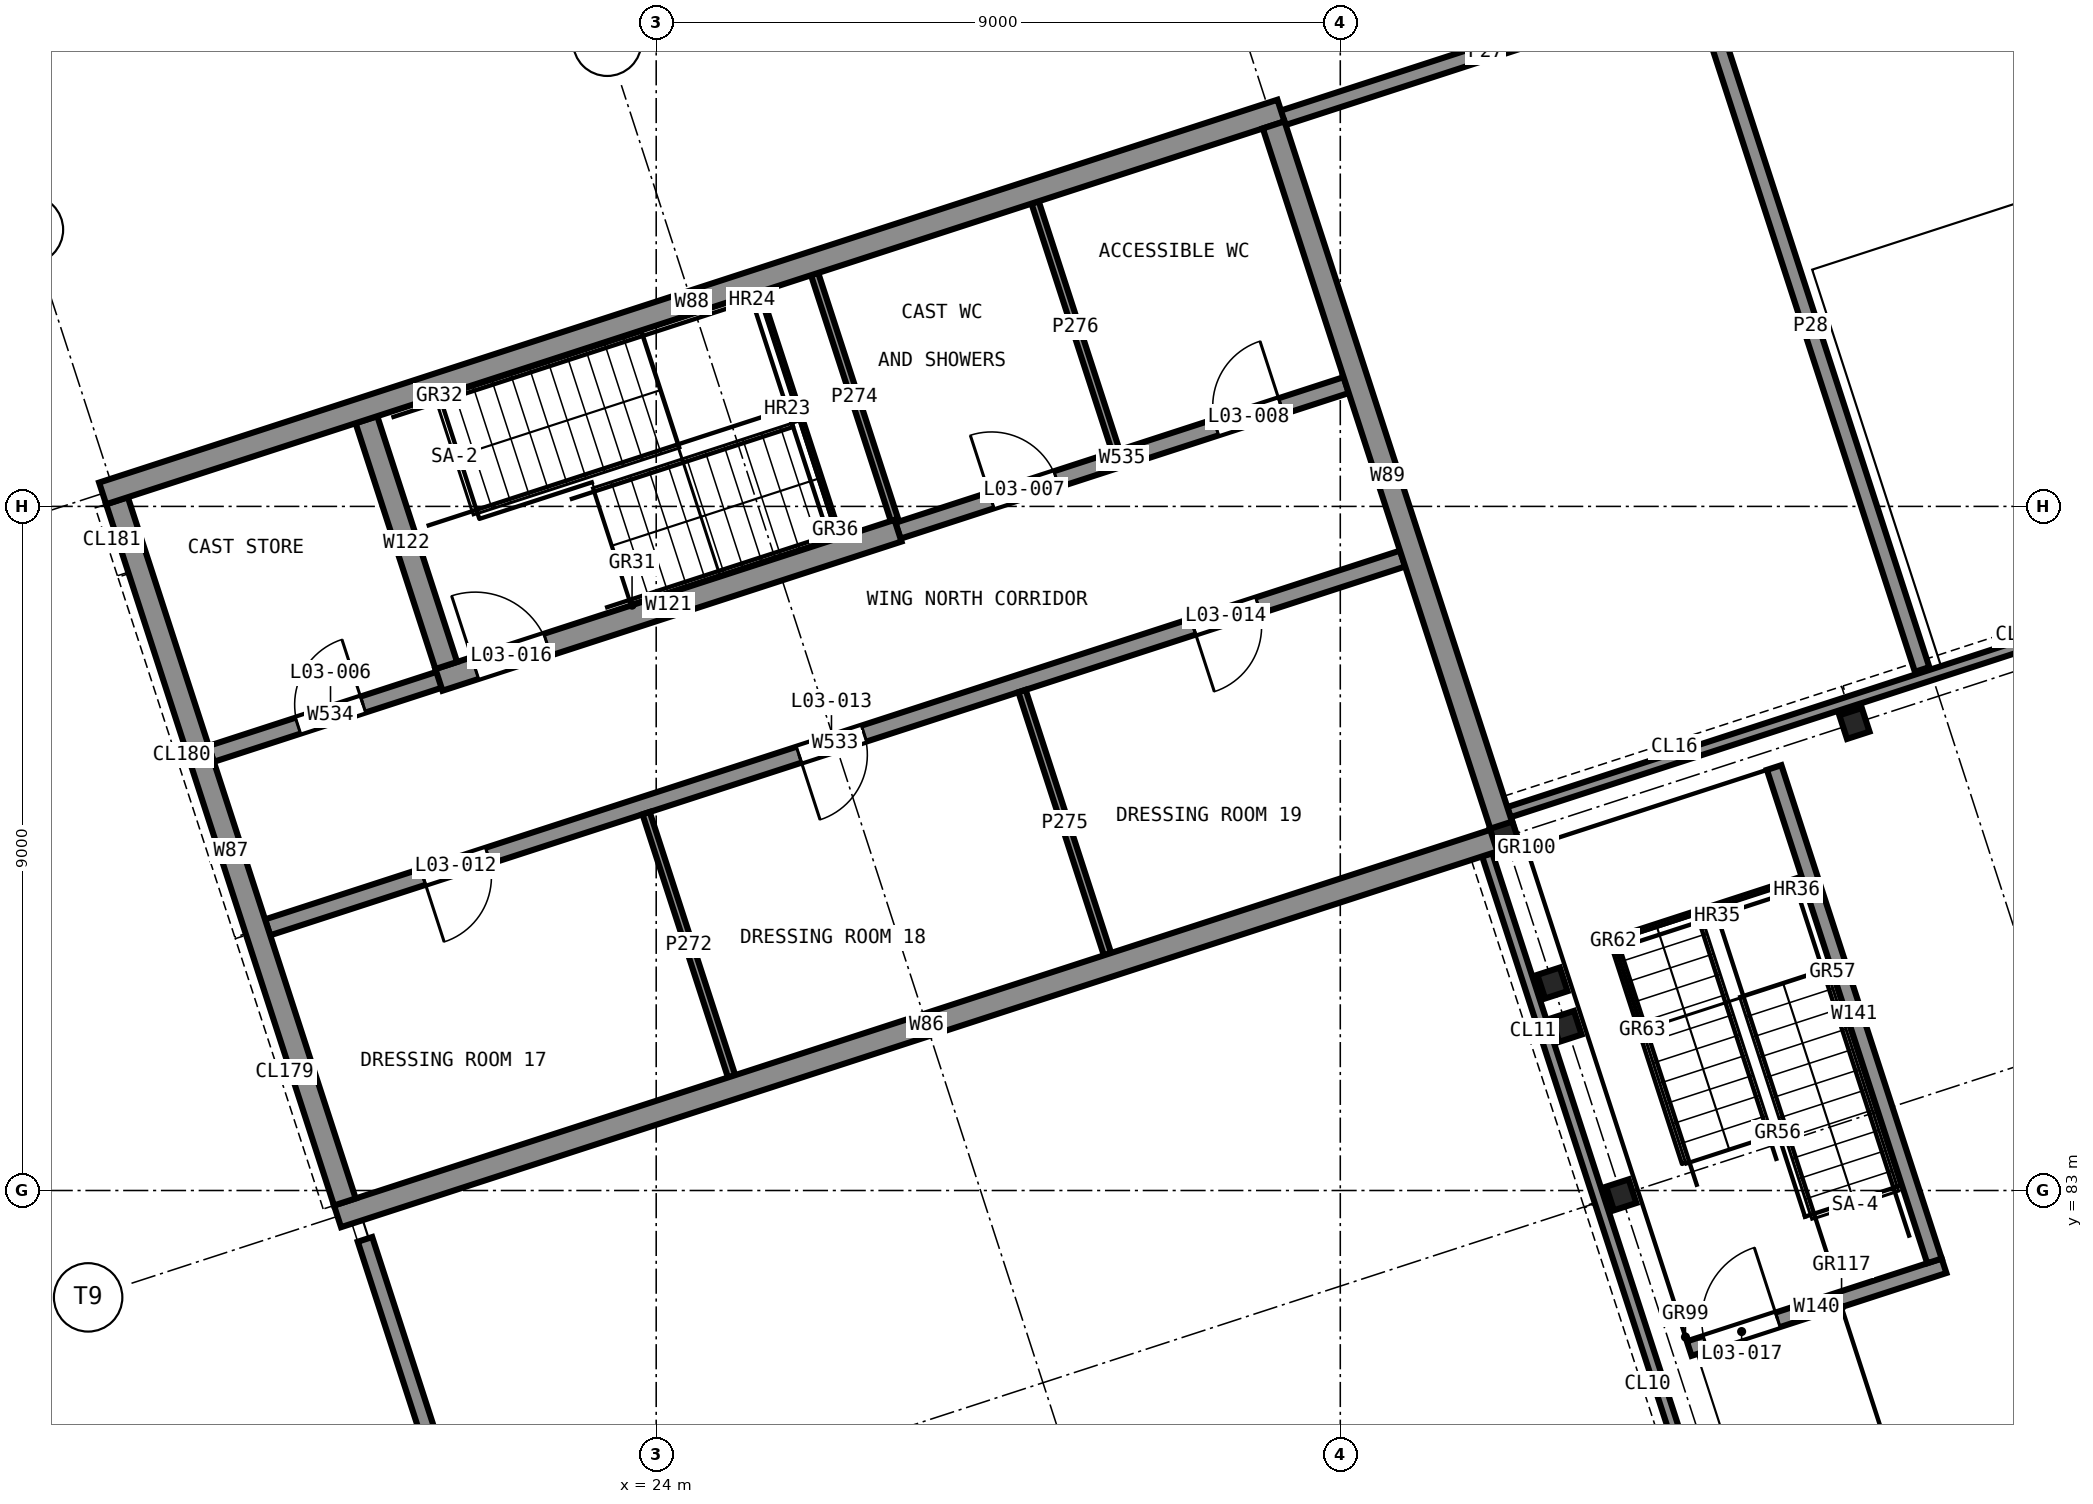
"""IFC4 building model, lengths in metres.
Left out: names, types, materials, properties, quantities, classifications, styles, units other than length and angle.
Written with IfcOpenShell. Run it as: python <this file> out.ifc"""

import sys

from ifc_helpers import new_model, si_unit, direction, frame, frame_2d, origin, origin_2d, place, context, subcontext, project, spatial, rectangle, i_section, extrude, element, fill, save


model = new_model("IFC4")
c1 = context("Model", 3, precision=1e-05, world=origin(), true_north=direction((0.0, 1.0)))
c2 = subcontext(c1, "Body", "Model", "MODEL_VIEW")
j1 = project(units=[si_unit("LENGTHUNIT", "METRE"), si_unit("PLANEANGLEUNIT", "RADIAN")], contexts=[c1])
p1 = place(None, origin())
s1 = spatial("IfcSite", under=j1, at=p1, CompositionType="ELEMENT")
p2 = place(p1, origin())
s2 = spatial("IfcBuilding", under=s1, at=p2, CompositionType="ELEMENT")
p3 = place(p2, frame((0.0, 0.0, 13.5)))
s3 = spatial("IfcBuildingStorey", under=s2, at=p3, CompositionType="ELEMENT", Elevation=13.5)
p4 = place(p3, frame((35.31, 87.697, 0.0), z_axis=(0.0, 0.0, 1.0), x_axis=(-0.951058391285, -0.309011223689, 0.0)))
e1 = element("IfcWall", 1, at=p4, inside=s3, PredefinedType="SOLIDWALL", context=c2, shape_type="SweptSolid", body=[
    extrude(rectangle(XDim=16.3, YDim=0.3, at=frame_2d((8.15, 0.0))), origin(), (0.0, 0.0, 1.0), 4.0),
])
p5 = place(p3, frame((19.904, 82.849, 0.0), z_axis=(0.0, 0.0, 1.0), x_axis=(-0.309000135, 0.951061994073, 0.0)))
e2 = element("IfcWall", 2, at=p5, inside=s3, PredefinedType="SOLIDWALL", context=c2, shape_type="SweptSolid", body=[
    extrude(rectangle(XDim=9.7, YDim=0.3, at=frame_2d((4.85, 0.0))), origin(), (0.0, 0.0, 1.0), 4.0),
])
p6 = place(p3, frame((16.718, 92.171, 0.0), z_axis=(0.0, 0.0, 1.0), x_axis=(0.951058391285, 0.309011223689, 0.0)))
e3 = element("IfcWall", 3, at=p6, inside=s3, PredefinedType="SOLIDWALL", context=c2, shape_type="SweptSolid", body=[
    extrude(rectangle(XDim=16.3, YDim=0.3, at=frame_2d((8.15, 0.0))), origin(), (0.0, 0.0, 1.0), 4.0),
])
p7 = place(p3, frame((32.123, 97.019, 0.0), z_axis=(0.0, 0.0, 1.0), x_axis=(0.309030297822, -0.95105219364, 0.0)))
e4 = element("IfcWall", 4, at=p7, inside=s3, PredefinedType="SOLIDWALL", context=c2, shape_type="SweptSolid", body=[
    extrude(rectangle(XDim=9.7, YDim=0.3, at=frame_2d((4.85, 0.0))), origin(), (0.0, 0.0, 1.0), 4.0),
])
for number, where, z_axis, x_axis in (
    (5, (35.977, 85.159, 0.0), (0.0, 0.0, 1.0), (0.951, 0.309, 0.0)),
    (6, (35.792, 85.729, 0.0), (0.0, 0.0, 1.0), (0.951, 0.309, 0.0)),
):
    element("IfcColumn", number, at=place(p3, frame(where, z_axis=z_axis, x_axis=x_axis)), inside=s3, PredefinedType="COLUMN", context=c2, shape_type="SweptSolid", body=[
        extrude(i_section(OverallWidth=0.311, OverallDepth=0.327, WebThickness=0.016, FlangeThickness=0.025, FilletRadius=0.017, at=origin_2d()), origin(), (0.0, 0.0, 1.0), 4.0),
    ])
p8 = place(p3, frame((27.181, 91.68, 0.0), z_axis=(0.0, 0.0, 1.0), x_axis=(-0.951051301895, -0.309033042189, 0.0)))
e7 = element("IfcWall", 7, at=p8, inside=s3, PredefinedType="SOLIDWALL", context=c2, shape_type="SweptSolid", body=[
    extrude(rectangle(XDim=6.35, YDim=0.3, at=frame_2d((3.175, 0.0))), origin(), (0.0, 0.0, 1.0), 3.7),
])
p9 = place(p8, frame((4.85, 0.0, 0.0)))
e8 = element("IfcOpeningElement", 8, at=p9, cuts=e7, PredefinedType="OPENING", context=c2, shape_type="SweptSolid", body=[
    extrude(rectangle(XDim=1.0, YDim=2.1, at=frame_2d((0.5, 1.05))), frame((0.0, 0.16, 0.0), z_axis=(0.0, -1.0, 0.0), x_axis=(1.0, 0.0, 0.0)), (0.0, 0.0, 1.0), 0.32),
])
p10 = place(p3, frame((21.238, 89.907, 0.0), z_axis=(0.0, 0.0, 1.0), x_axis=(-0.309066587596, 0.951040401051, 0.0)))
e9 = element("IfcWall", 9, at=p10, inside=s3, PredefinedType="SOLIDWALL", context=c2, shape_type="SweptSolid", body=[
    extrude(rectangle(XDim=3.4, YDim=0.3, at=frame_2d((1.7, 0.0))), origin(), (0.0, 0.0, 1.0), 3.7),
])
p11 = place(p3, frame((37.591, 80.92, 0.0), z_axis=(0.0, 0.0, 1.0), x_axis=(0.951052389726, 0.30902969436, 0.0)))
e10 = element("IfcWall", 10, at=p11, inside=s3, PredefinedType="SOLIDWALL", context=c2, shape_type="SweptSolid", body=[
    extrude(rectangle(XDim=3.525, YDim=0.2, at=frame_2d((1.763, 0.0))), origin(), (0.0, 0.0, 1.0), 4.0),
])
p12 = place(p11, frame((0.225, 0.0, 0.0)))
e11 = element("IfcOpeningElement", 11, at=p12, cuts=e10, PredefinedType="OPENING", context=c2, shape_type="SweptSolid", body=[
    extrude(rectangle(XDim=1.0, YDim=2.1, at=frame_2d((0.5, 1.05))), frame((0.0, 0.11, 0.0), z_axis=(0.0, -1.0, 0.0), x_axis=(1.0, 0.0, 0.0)), (0.0, 0.0, 1.0), 0.22),
])
p13 = place(p3, frame((40.817, 82.074, 0.0), z_axis=(0.0, 0.0, 1.0), x_axis=(-0.309028643499, 0.951052731186, 0.0)))
e12 = element("IfcWall", 12, at=p13, inside=s3, PredefinedType="SOLIDWALL", context=c2, shape_type="SweptSolid", body=[
    extrude(rectangle(XDim=6.825, YDim=0.2, at=frame_2d((3.413, 0.0))), origin(), (0.0, 0.0, 1.0), 4.0),
])
for number, where, z_axis, x_axis in (
    (13, (36.697, 82.943, 0.0), (0.0, 0.0, 1.0), (0.951, 0.309, 0.0)),
    (14, (35.167, 87.651, 0.0), (0.0, 0.0, 1.0), (0.951, 0.309, 0.0)),
    (15, (39.764, 89.144, 0.0), (0.0, 0.0, 1.0), (0.951, 0.309, 0.0)),
):
    element("IfcColumn", number, at=place(p3, frame(where, z_axis=z_axis, x_axis=x_axis)), inside=s3, PredefinedType="COLUMN", context=c2, shape_type="SweptSolid", body=[
        extrude(i_section(OverallWidth=0.311, OverallDepth=0.327, WebThickness=0.016, FlangeThickness=0.025, FilletRadius=0.017, at=origin_2d()), origin(), (0.0, 0.0, 1.0), 4.0),
    ])
p14 = place(p3, frame((41.005, 68.729, 0.0), z_axis=(0.0, 0.0, 1.0), x_axis=(-0.309017523599, 0.95105634434, 0.0)))
e16 = element("IfcWall", 16, at=p14, inside=s3, PredefinedType="SOLIDWALL", context=c2, shape_type="SweptSolid", body=[
    extrude(rectangle(XDim=19.65, YDim=0.14, at=frame_2d((9.825, 0.0))), origin(), (0.0, 0.0, 1.0), 4.0),
])
p15 = place(p3, frame((35.219, 87.978, 0.0), z_axis=(0.0, 0.0, 1.0), x_axis=(0.951055192004, 0.309021070093, 0.0)))
e17 = element("IfcWall", 17, at=p15, inside=s3, PredefinedType="SOLIDWALL", context=c2, shape_type="SweptSolid", body=[
    extrude(rectangle(XDim=29.215, YDim=0.14, at=frame_2d((14.607, 0.0))), origin(), (0.0, 0.0, 1.0), 4.0),
])
p16 = place(p3, frame((26.102, 64.097, 0.0), z_axis=(0.0, 0.0, 1.0), x_axis=(-0.309016491071, 0.951056679828, 0.0)))
e18 = element("IfcWall", 18, at=p16, inside=s3, PredefinedType="PARAPET", context=c2, shape_type="SweptSolid", body=[
    extrude(rectangle(XDim=19.2, YDim=0.2, at=frame_2d((9.6, 0.0))), origin(), (0.0, 0.0, 1.0), 1.0),
])
p17 = place(p3, frame((32.108, 97.066, 0.0), z_axis=(0.0, 0.0, 1.0), x_axis=(0.951055960514, 0.309018704887, 0.0)))
e19 = element("IfcWall", 19, at=p17, inside=s3, PredefinedType="PARAPET", context=c2, shape_type="SweptSolid", body=[
    extrude(rectangle(XDim=5.9, YDim=0.2, at=frame_2d((2.95, 0.0))), origin(), (0.0, 0.0, 1.0), 1.0),
])
p18 = place(p3, frame((37.719, 98.889, 0.0), z_axis=(0.0, 0.0, 1.0), x_axis=(0.309002393867, -0.951061260164, 0.0)))
e20 = element("IfcWall", 20, at=p18, inside=s3, PredefinedType="PARAPET", context=c2, shape_type="SweptSolid", body=[
    extrude(rectangle(XDim=9.5, YDim=0.2, at=frame_2d((4.75, 0.0))), origin(), (0.0, 0.0, 1.0), 1.0),
])
p19 = place(p3, frame((18.888, 86.462, 0.0), z_axis=(0.0, 0.0, 1.0), x_axis=(0.951056921306, 0.309015747878, 0.0)))
e21 = element("IfcWall", 21, at=p19, inside=s3, PredefinedType="SOLIDWALL", context=c2, shape_type="SweptSolid", body=[
    extrude(rectangle(XDim=15.7, YDim=0.22, at=frame_2d((7.85, 0.0))), origin(), (0.0, 0.0, 1.0), 3.7),
])
p20 = place(p19, frame((2.15, 0.0, 0.0)))
e22 = element("IfcOpeningElement", 22, at=p20, cuts=e21, PredefinedType="OPENING", context=c2, shape_type="SweptSolid", body=[
    extrude(rectangle(XDim=0.9, YDim=2.1, at=frame_2d((0.45, 1.05))), frame((0.0, 0.12, 0.0), z_axis=(0.0, -1.0, 0.0), x_axis=(1.0, 0.0, 0.0)), (0.0, 0.0, 1.0), 0.24),
])
p21 = place(p19, frame((7.35, 0.0, 0.0)))
e23 = element("IfcOpeningElement", 23, at=p21, cuts=e21, PredefinedType="OPENING", context=c2, shape_type="SweptSolid", body=[
    extrude(rectangle(XDim=0.9, YDim=2.1, at=frame_2d((0.45, 1.05))), frame((0.0, 0.12, 0.0), z_axis=(0.0, -1.0, 0.0), x_axis=(1.0, 0.0, 0.0)), (0.0, 0.0, 1.0), 0.24),
])
p22 = place(p19, frame((12.804, 0.0, 0.0)))
e24 = element("IfcOpeningElement", 24, at=p22, cuts=e21, PredefinedType="OPENING", context=c2, shape_type="SweptSolid", body=[
    extrude(rectangle(XDim=0.9, YDim=2.1, at=frame_2d((0.45, 1.05))), frame((0.0, 0.12, 0.0), z_axis=(0.0, -1.0, 0.0), x_axis=(1.0, 0.0, 0.0)), (0.0, 0.0, 1.0), 0.24),
])
p23 = place(p3, frame((18.146, 88.744, 0.0), z_axis=(0.0, 0.0, 1.0), x_axis=(0.951053095941, 0.309027520945, 0.0)))
e25 = element("IfcWall", 25, at=p23, inside=s3, PredefinedType="SOLIDWALL", context=c2, shape_type="SweptSolid", body=[
    extrude(rectangle(XDim=3.3, YDim=0.22, at=frame_2d((1.65, 0.0))), origin(), (0.0, 0.0, 1.0), 3.7),
])
p24 = place(p23, frame((1.2, 0.0, 0.0)))
e26 = element("IfcOpeningElement", 26, at=p24, cuts=e25, PredefinedType="OPENING", context=c2, shape_type="SweptSolid", body=[
    extrude(rectangle(XDim=0.9, YDim=2.1, at=frame_2d((0.45, 1.05))), frame((0.0, 0.12, 0.0), z_axis=(0.0, -1.0, 0.0), x_axis=(1.0, 0.0, 0.0)), (0.0, 0.0, 1.0), 0.24),
])
p25 = place(p3, frame((27.181, 91.68, 0.0), z_axis=(0.0, 0.0, 1.0), x_axis=(0.95106184554, 0.309000592164, 0.0)))
e27 = element("IfcWall", 27, at=p25, inside=s3, PredefinedType="SOLIDWALL", context=c2, shape_type="SweptSolid", body=[
    extrude(rectangle(XDim=6.2, YDim=0.22, at=frame_2d((3.1, 0.0))), origin(), (0.0, 0.0, 1.0), 3.7),
])
p26 = place(p25, frame((1.293, 0.0, 0.0)))
e28 = element("IfcOpeningElement", 28, at=p26, cuts=e27, PredefinedType="OPENING", context=c2, shape_type="SweptSolid", body=[
    extrude(rectangle(XDim=0.9, YDim=2.1, at=frame_2d((0.45, 1.05))), frame((0.0, 0.12, 0.0), z_axis=(0.0, -1.0, 0.0), x_axis=(1.0, 0.0, 0.0)), (0.0, 0.0, 1.0), 0.24),
])
p27 = place(p25, frame((4.4, 0.0, 0.0)))
e29 = element("IfcOpeningElement", 29, at=p27, cuts=e27, PredefinedType="OPENING", context=c2, shape_type="SweptSolid", body=[
    extrude(rectangle(XDim=0.9, YDim=2.1, at=frame_2d((0.45, 1.05))), frame((0.0, 0.12, 0.0), z_axis=(0.0, -1.0, 0.0), x_axis=(1.0, 0.0, 0.0)), (0.0, 0.0, 1.0), 0.24),
])
p28 = place(p3, frame((24.992, 84.502, 0.0), z_axis=(0.0, 0.0, 1.0), x_axis=(-0.309075455797, 0.951037519041, 0.0)))
e30 = element("IfcWall", 30, at=p28, inside=s3, PredefinedType="PARTITIONING", context=c2, shape_type="SweptSolid", body=[
    extrude(rectangle(XDim=3.64, YDim=0.1, at=frame_2d((1.82, 0.0))), origin(), (0.0, 0.0, 1.0), 3.7),
])
p29 = place(p3, frame((27.135, 91.823, 0.0), z_axis=(0.0, 0.0, 1.0), x_axis=(-0.308980533303, 0.951068362443, 0.0)))
e31 = element("IfcWall", 31, at=p29, inside=s3, PredefinedType="PARTITIONING", context=c2, shape_type="SweptSolid", body=[
    extrude(rectangle(XDim=3.4, YDim=0.1, at=frame_2d((1.7, 0.0))), origin(), (0.0, 0.0, 1.0), 3.7),
])
p30 = place(p3, frame((29.938, 86.109, 0.0), z_axis=(0.0, 0.0, 1.0), x_axis=(-0.308995076085, 0.9510636377, 0.0)))
e32 = element("IfcWall", 32, at=p30, inside=s3, PredefinedType="PARTITIONING", context=c2, shape_type="SweptSolid", body=[
    extrude(rectangle(XDim=3.64, YDim=0.1, at=frame_2d((1.82, 0.0))), origin(), (0.0, 0.0, 1.0), 3.7),
])
p31 = place(p3, frame((30.048, 92.727, 0.0), z_axis=(0.0, 0.0, 1.0), x_axis=(-0.309021877853, 0.951054929543, 0.0)))
e33 = element("IfcWall", 33, at=p31, inside=s3, PredefinedType="PARTITIONING", context=c2, shape_type="SweptSolid", body=[
    extrude(rectangle(XDim=3.44, YDim=0.1, at=frame_2d((1.72, 0.0))), origin(), (0.0, 0.0, 1.0), 3.7),
])
p32 = place(p24, origin())
e34 = element("IfcDoor", 34, at=p32, inside=s3, OperationType="SINGLE_SWING_LEFT", PredefinedType="DOOR", context=c2, shape_type="SweptSolid", body=[
    extrude(rectangle(XDim=0.9, YDim=2.1, at=frame_2d((0.45, 1.05))), frame((0.0, 0.025, 0.0), z_axis=(0.0, -1.0, 0.0), x_axis=(1.0, 0.0, 0.0)), (0.0, 0.0, 1.0), 0.05),
])
fill(e26, e34)
p33 = place(p26, origin())
e35 = element("IfcDoor", 35, at=p33, inside=s3, OperationType="SINGLE_SWING_RIGHT", PredefinedType="DOOR", context=c2, shape_type="SweptSolid", body=[
    extrude(rectangle(XDim=0.9, YDim=2.1, at=frame_2d((0.45, 1.05))), frame((0.0, 0.025, 0.0), z_axis=(0.0, -1.0, 0.0), x_axis=(1.0, 0.0, 0.0)), (0.0, 0.0, 1.0), 0.05),
])
fill(e28, e35)
p34 = place(p27, origin())
e36 = element("IfcDoor", 36, at=p34, inside=s3, OperationType="SINGLE_SWING_LEFT", PredefinedType="DOOR", context=c2, shape_type="SweptSolid", body=[
    extrude(rectangle(XDim=0.9, YDim=2.1, at=frame_2d((0.45, 1.05))), frame((0.0, 0.025, 0.0), z_axis=(0.0, -1.0, 0.0), x_axis=(1.0, 0.0, 0.0)), (0.0, 0.0, 1.0), 0.05),
])
fill(e29, e36)
p35 = place(p20, frame((0.9, 0.0, 0.0), z_axis=(0.0, 0.0, 1.0), x_axis=(-1.0, 0.0, 0.0)))
e37 = element("IfcDoor", 37, at=p35, inside=s3, OperationType="SINGLE_SWING_LEFT", PredefinedType="DOOR", context=c2, shape_type="SweptSolid", body=[
    extrude(rectangle(XDim=0.9, YDim=2.1, at=frame_2d((0.45, 1.05))), frame((0.0, 0.025, 0.0), z_axis=(0.0, -1.0, 0.0), x_axis=(1.0, 0.0, 0.0)), (0.0, 0.0, 1.0), 0.05),
])
fill(e22, e37)
p36 = place(p21, frame((0.9, 0.0, 0.0), z_axis=(0.0, 0.0, 1.0), x_axis=(-1.0, 0.0, 0.0)))
e38 = element("IfcDoor", 38, at=p36, inside=s3, OperationType="SINGLE_SWING_LEFT", PredefinedType="DOOR", context=c2, shape_type="SweptSolid", body=[
    extrude(rectangle(XDim=0.9, YDim=2.1, at=frame_2d((0.45, 1.05))), frame((0.0, 0.025, 0.0), z_axis=(0.0, -1.0, 0.0), x_axis=(1.0, 0.0, 0.0)), (0.0, 0.0, 1.0), 0.05),
])
fill(e23, e38)
p37 = place(p22, frame((0.9, 0.0, 0.0), z_axis=(0.0, 0.0, 1.0), x_axis=(-1.0, 0.0, 0.0)))
e39 = element("IfcDoor", 39, at=p37, inside=s3, OperationType="SINGLE_SWING_LEFT", PredefinedType="DOOR", context=c2, shape_type="SweptSolid", body=[
    extrude(rectangle(XDim=0.9, YDim=2.1, at=frame_2d((0.45, 1.05))), frame((0.0, 0.025, 0.0), z_axis=(0.0, -1.0, 0.0), x_axis=(1.0, 0.0, 0.0)), (0.0, 0.0, 1.0), 0.05),
])
fill(e24, e39)
p38 = place(p9, frame((1.0, 0.0, 0.0), z_axis=(0.0, 0.0, 1.0), x_axis=(-1.0, 0.0, 0.0)))
e40 = element("IfcDoor", 40, at=p38, inside=s3, OperationType="SINGLE_SWING_RIGHT", PredefinedType="DOOR", context=c2, shape_type="SweptSolid", body=[
    extrude(rectangle(XDim=1.0, YDim=2.1, at=frame_2d((0.5, 1.05))), frame((0.0, 0.025, 0.0), z_axis=(0.0, -1.0, 0.0), x_axis=(1.0, 0.0, 0.0)), (0.0, 0.0, 1.0), 0.05),
])
fill(e8, e40)
p39 = place(p12, origin())
e41 = element("IfcDoor", 41, at=p39, inside=s3, OperationType="SINGLE_SWING_LEFT", PredefinedType="DOOR", context=c2, shape_type="SweptSolid", body=[
    extrude(rectangle(XDim=1.0, YDim=2.1, at=frame_2d((0.5, 1.05))), frame((0.0, 0.025, 0.0), z_axis=(0.0, -1.0, 0.0), x_axis=(1.0, 0.0, 0.0)), (0.0, 0.0, 1.0), 0.05),
])
fill(e11, e41)
save(model, sys.argv[1])
